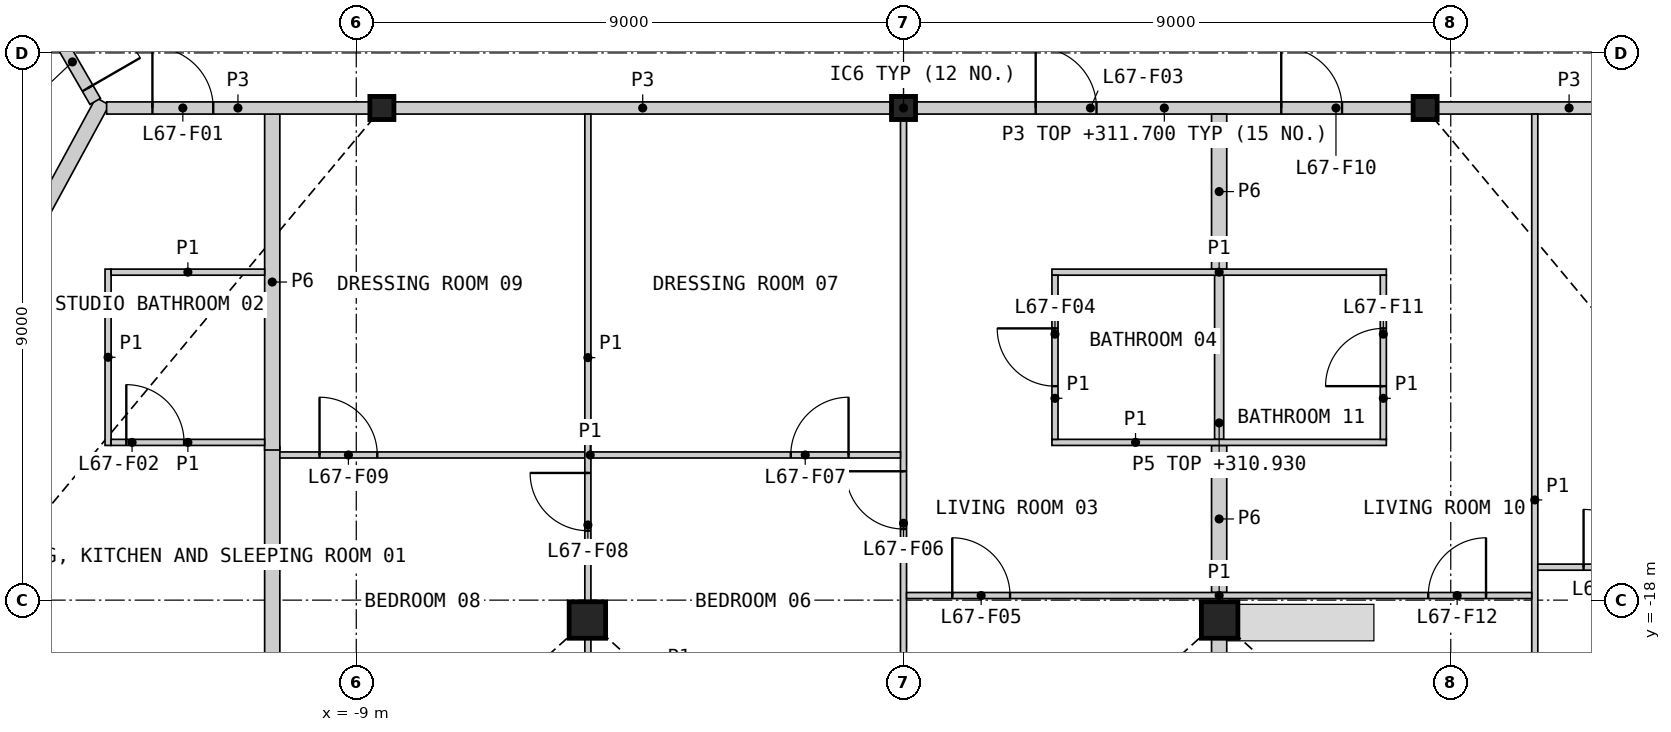
"""IFC4 building model, lengths in metres.
Left out: names, types, materials, properties, quantities, classifications, styles, units other than length and angle.
Written with IfcOpenShell. Run it as: python <this file> out.ifc"""

import sys

from ifc_helpers import new_model, si_unit, direction, frame, frame_2d, origin, origin_2d, place, context, subcontext, project, spatial, rectangle, hollow_rectangle, i_section, extrude, element, fill, save


model = new_model("IFC4")
c1 = context("Model", 3, precision=1e-05, world=origin(), true_north=direction((0.0, 1.0)))
c2 = subcontext(c1, "Body", "Model", "MODEL_VIEW")
j1 = project(units=[si_unit("LENGTHUNIT", "METRE"), si_unit("PLANEANGLEUNIT", "RADIAN")], contexts=[c1])
p1 = place(None, origin())
s1 = spatial("IfcSite", under=j1, at=p1, CompositionType="ELEMENT")
p2 = place(p1, origin())
s2 = spatial("IfcBuilding", under=s1, at=p2, CompositionType="ELEMENT")
p3 = place(p2, frame((0.0, 0.0, 308.6)))
s3 = spatial("IfcBuildingStorey", under=s2, at=p3, CompositionType="ELEMENT", Elevation=308.6)
for number, where, z_axis, x_axis in (
    (1, (-5.199, -18.327, 0.0), (0.0, 0.0, 1.0), (1.0, 0.0, 0.0)),
    (2, (5.199, -18.327, 0.0), (0.0, 0.0, 1.0), (1.0, 0.0, 0.0)),
):
    element("IfcColumn", number, at=place(p3, frame(where, z_axis=z_axis, x_axis=x_axis)), inside=s3, PredefinedType="COLUMN", context=c2, shape_type="SweptSolid", body=[
        extrude(hollow_rectangle(XDim=0.6, YDim=0.6, WallThickness=0.04, at=origin_2d()), origin(), (0.0, 0.0, 1.0), 3.4),
    ])
for number, where, z_axis, x_axis in (
    (3, (-8.578, -9.906, 0.0), (0.0, 0.0, 1.0), (1.0, 0.0, 0.0)),
    (4, (0.0, -9.906, 0.0), (0.0, 0.0, 1.0), (1.0, 0.0, 0.0)),
    (5, (8.578, -9.906, 0.0), (0.0, 0.0, 1.0), (1.0, 0.0, 0.0)),
):
    element("IfcColumn", number, at=place(p3, frame(where, z_axis=z_axis, x_axis=x_axis)), inside=s3, PredefinedType="COLUMN", context=c2, shape_type="SweptSolid", body=[
        extrude(i_section(OverallWidth=0.396, OverallDepth=0.381, WebThickness=0.019, FlangeThickness=0.03, at=origin_2d()), origin(), (0.0, 0.0, 1.0), 3.4),
    ])
p4 = place(p3, frame((-20.383, -23.078, 0.0), z_axis=(0.0, 0.0, 1.0), x_axis=(0.477177412766, 0.878806984921, 0.0)))
e6 = element("IfcWall", 6, at=p4, inside=s3, PredefinedType="PARTITIONING", context=c2, shape_type="SweptSolid", body=[
    extrude(rectangle(XDim=15.114, YDim=0.25, at=frame_2d((7.557, 0.0))), origin(), (0.0, 0.0, 1.0), 2.33),
])
p5 = place(p3, frame((0.208, -9.906, 0.0), z_axis=(0.0, 0.0, 1.0), x_axis=(1.0, 0.0, 0.0)))
e7 = element("IfcWall", 7, at=p5, inside=s3, PredefinedType="PARTITIONING", context=c2, shape_type="SweptSolid", body=[
    extrude(rectangle(XDim=8.163, YDim=0.2, at=frame_2d((4.082, 0.0))), origin(), (0.0, 0.0, 1.0), 3.1),
])
p6 = place(p5, frame((1.966, 0.0, 0.0)))
e8 = element("IfcOpeningElement", 8, at=p6, cuts=e7, PredefinedType="OPENING", context=c2, shape_type="SweptSolid", body=[
    extrude(rectangle(XDim=1.0, YDim=2.1, at=frame_2d((0.5, 1.05))), frame((0.0, 0.11, 0.0), z_axis=(0.0, -1.0, 0.0), x_axis=(1.0, 0.0, 0.0)), (0.0, 0.0, 1.0), 0.22),
])
p7 = place(p5, frame((6.004, 0.0, 0.0)))
e9 = element("IfcOpeningElement", 9, at=p7, cuts=e7, PredefinedType="OPENING", context=c2, shape_type="SweptSolid", body=[
    extrude(rectangle(XDim=1.0, YDim=2.1, at=frame_2d((0.5, 1.05))), frame((0.0, 0.11, 0.0), z_axis=(0.0, -1.0, 0.0), x_axis=(1.0, 0.0, 0.0)), (0.0, 0.0, 1.0), 0.22),
])
p8 = place(p3, frame((-8.371, -9.906, 0.0), z_axis=(0.0, 0.0, 1.0), x_axis=(1.0, 0.0, 0.0)))
e10 = element("IfcWall", 10, at=p8, inside=s3, PredefinedType="PARTITIONING", context=c2, shape_type="SweptSolid", body=[
    extrude(rectangle(XDim=8.163, YDim=0.2, at=frame_2d((4.082, 0.0))), origin(), (0.0, 0.0, 1.0), 3.1),
])
p9 = place(p3, frame((-10.382, -22.698, 0.0), z_axis=(0.0, 0.0, 1.0), x_axis=(0.0, 1.0, 0.0)))
e11 = element("IfcWall", 11, at=p9, inside=s3, PredefinedType="PARTITIONING", context=c2, shape_type="SweptSolid", body=[
    extrude(rectangle(XDim=7.22, YDim=0.25, at=frame_2d((3.61, 0.0))), origin(), (0.0, 0.0, 1.0), 2.33),
])
p10 = place(p3, frame((-10.382, -15.531, 0.0), z_axis=(0.0, 0.0, 1.0), x_axis=(0.0, 1.0, 0.0)))
e12 = element("IfcWall", 12, at=p10, inside=s3, PredefinedType="PARTITIONING", context=c2, shape_type="SweptSolid", body=[
    extrude(rectangle(XDim=5.525, YDim=0.25, at=frame_2d((2.762, 0.0))), origin(), (0.0, 0.0, 1.0), 2.33),
])
p11 = place(p3, frame((-13.106, -9.906, 0.0), z_axis=(0.0, 0.0, 1.0), x_axis=(1.0, 0.0, 0.0)))
e13 = element("IfcWall", 13, at=p11, inside=s3, PredefinedType="PARTITIONING", context=c2, shape_type="SweptSolid", body=[
    extrude(rectangle(XDim=4.32, YDim=0.2, at=frame_2d((2.16, 0.0))), origin(), (0.0, 0.0, 1.0), 3.1),
])
p12 = place(p11, frame((0.753, 0.0, 0.0)))
e14 = element("IfcOpeningElement", 14, at=p12, cuts=e13, PredefinedType="OPENING", context=c2, shape_type="SweptSolid", body=[
    extrude(rectangle(XDim=1.0, YDim=2.1, at=frame_2d((0.5, 1.05))), frame((0.0, 0.11, 0.0), z_axis=(0.0, -1.0, 0.0), x_axis=(1.0, 0.0, 0.0)), (0.0, 0.0, 1.0), 0.22),
])
p13 = place(p3, frame((8.786, -9.906, 0.0), z_axis=(0.0, 0.0, 1.0), x_axis=(1.0, 0.0, 0.0)))
e15 = element("IfcWall", 15, at=p13, inside=s3, PredefinedType="PARTITIONING", context=c2, shape_type="SweptSolid", body=[
    extrude(rectangle(XDim=4.32, YDim=0.2, at=frame_2d((2.16, 0.0))), origin(), (0.0, 0.0, 1.0), 3.1),
])
p14 = place(p3, frame((-15.131, -6.614, 0.0), z_axis=(0.0, 0.0, 1.0), x_axis=(0.499967746641, -0.866044024469, 0.0)))
e16 = element("IfcWall", 16, at=p14, inside=s3, PredefinedType="PARTITIONING", context=c2, shape_type="SweptSolid", body=[
    extrude(rectangle(XDim=3.676, YDim=0.2, at=frame_2d((1.838, 0.0))), origin(), (0.0, 0.0, 1.0), 3.1),
])
p15 = place(p14, frame((2.426, 0.0, 0.0)))
e17 = element("IfcOpeningElement", 17, at=p15, cuts=e16, PredefinedType="OPENING", context=c2, shape_type="SweptSolid", body=[
    extrude(rectangle(XDim=1.0, YDim=2.1, at=frame_2d((0.5, 1.05))), frame((0.0, 0.11, 0.0), z_axis=(0.0, -1.0, 0.0), x_axis=(1.0, 0.0, 0.0)), (0.0, 0.0, 1.0), 0.22),
])
p16 = place(p3, frame((5.191, -12.556, 0.0), z_axis=(0.0, 0.0, 1.0), x_axis=(0.0, 1.0, 0.0)))
e18 = element("IfcWall", 18, at=p16, inside=s3, PredefinedType="PARTITIONING", context=c2, shape_type="SweptSolid", body=[
    extrude(rectangle(XDim=2.55, YDim=0.25, at=frame_2d((1.275, 0.0))), origin(), (0.0, 0.0, 1.0), 2.33),
])
p17 = place(p3, frame((5.191, -17.875, 0.0), z_axis=(0.0, 0.0, 1.0), x_axis=(0.0, 1.0, 0.0)))
e19 = element("IfcWall", 19, at=p17, inside=s3, PredefinedType="PARTITIONING", context=c2, shape_type="SweptSolid", body=[
    extrude(rectangle(XDim=2.419, YDim=0.25, at=frame_2d((1.209, 0.0))), origin(), (0.0, 0.0, 1.0), 2.33),
])
p18 = place(p3, frame((5.191, -19.055, 0.0), z_axis=(0.0, 0.0, 1.0), x_axis=(0.0, 1.0, 0.0)))
e20 = element("IfcWall", 20, at=p18, inside=s3, PredefinedType="PARTITIONING", context=c2, shape_type="SweptSolid", body=[
    extrude(rectangle(XDim=0.418, YDim=0.25, at=frame_2d((0.209, 0.0))), origin(), (0.0, 0.0, 1.0), 2.33),
])
p19 = place(p3, frame((5.191, -15.356, 0.0), z_axis=(0.0, 0.0, 1.0), x_axis=(0.0, 1.0, 0.0)))
e21 = element("IfcWall", 21, at=p19, inside=s3, PredefinedType="PLUMBINGWALL", context=c2, shape_type="SweptSolid", body=[
    extrude(rectangle(XDim=2.7, YDim=0.15, at=frame_2d((1.35, 0.0))), origin(), (0.0, 0.0, 1.0), 2.33),
])
p20 = place(p3, frame((10.382, -22.698, 0.0), z_axis=(0.0, 0.0, 1.0), x_axis=(0.0, 1.0, 0.0)))
e22 = element("IfcWall", 22, at=p20, inside=s3, PredefinedType="PARTITIONING", context=c2, shape_type="SweptSolid", body=[
    extrude(rectangle(XDim=12.692, YDim=0.1, at=frame_2d((6.346, 0.0))), origin(), (0.0, 0.0, 1.0), 2.33),
])
p21 = place(p20, frame((1.153, 0.0, 0.0)))
e23 = element("IfcOpeningElement", 23, at=p21, cuts=e22, PredefinedType="OPENING", context=c2, shape_type="SweptSolid", body=[
    extrude(rectangle(XDim=0.95, YDim=2.1, at=frame_2d((0.475, 1.05))), frame((0.0, 0.06, 0.0), z_axis=(0.0, -1.0, 0.0), x_axis=(1.0, 0.0, 0.0)), (0.0, 0.0, 1.0), 0.12),
])
p22 = place(p3, frame((0.0, -22.698, 0.0), z_axis=(0.0, 0.0, 1.0), x_axis=(0.0, 1.0, 0.0)))
e24 = element("IfcWall", 24, at=p22, inside=s3, PredefinedType="PARTITIONING", context=c2, shape_type="SweptSolid", body=[
    extrude(rectangle(XDim=12.585, YDim=0.1, at=frame_2d((6.292, 0.0))), origin(), (0.0, 0.0, 1.0), 2.33),
])
p23 = place(p22, frame((5.868, 0.0, 0.0)))
e25 = element("IfcOpeningElement", 25, at=p23, cuts=e24, PredefinedType="OPENING", context=c2, shape_type="SweptSolid", body=[
    extrude(rectangle(XDim=0.95, YDim=2.1, at=frame_2d((0.475, 1.05))), frame((0.0, 0.06, 0.0), z_axis=(0.0, -1.0, 0.0), x_axis=(1.0, 0.0, 0.0)), (0.0, 0.0, 1.0), 0.12),
])
p24 = place(p3, frame((0.05, -17.924, 0.0), z_axis=(0.0, 0.0, 1.0), x_axis=(1.0, 0.0, 0.0)))
e26 = element("IfcWall", 26, at=p24, inside=s3, PredefinedType="PARTITIONING", context=c2, shape_type="SweptSolid", body=[
    extrude(rectangle(XDim=10.282, YDim=0.1, at=frame_2d((5.141, 0.0))), origin(), (0.0, 0.0, 1.0), 2.33),
])
p25 = place(p24, frame((0.752, 0.0, 0.0)))
e27 = element("IfcOpeningElement", 27, at=p25, cuts=e26, PredefinedType="OPENING", context=c2, shape_type="SweptSolid", body=[
    extrude(rectangle(XDim=0.95, YDim=2.1, at=frame_2d((0.475, 1.05))), frame((0.0, 0.06, 0.0), z_axis=(0.0, -1.0, 0.0), x_axis=(1.0, 0.0, 0.0)), (0.0, 0.0, 1.0), 0.12),
])
p26 = place(p24, frame((8.58, 0.0, 0.0)))
e28 = element("IfcOpeningElement", 28, at=p26, cuts=e26, PredefinedType="OPENING", context=c2, shape_type="SweptSolid", body=[
    extrude(rectangle(XDim=0.95, YDim=2.1, at=frame_2d((0.475, 1.05))), frame((0.0, 0.06, 0.0), z_axis=(0.0, -1.0, 0.0), x_axis=(1.0, 0.0, 0.0)), (0.0, 0.0, 1.0), 0.12),
])
p27 = place(p3, frame((-10.257, -15.613, 0.0), z_axis=(0.0, 0.0, 1.0), x_axis=(1.0, 0.0, 0.0)))
e29 = element("IfcWall", 29, at=p27, inside=s3, PredefinedType="PARTITIONING", context=c2, shape_type="SweptSolid", body=[
    extrude(rectangle(XDim=10.207, YDim=0.1, at=frame_2d((5.104, 0.0))), origin(), (0.0, 0.0, 1.0), 2.33),
])
p28 = place(p27, frame((8.403, 0.0, 0.0)))
e30 = element("IfcOpeningElement", 30, at=p28, cuts=e29, PredefinedType="OPENING", context=c2, shape_type="SweptSolid", body=[
    extrude(rectangle(XDim=0.95, YDim=2.1, at=frame_2d((0.475, 1.05))), frame((0.0, 0.06, 0.0), z_axis=(0.0, -1.0, 0.0), x_axis=(1.0, 0.0, 0.0)), (0.0, 0.0, 1.0), 0.12),
])
p29 = place(p27, frame((0.653, 0.0, 0.0)))
e31 = element("IfcOpeningElement", 31, at=p29, cuts=e29, PredefinedType="OPENING", context=c2, shape_type="SweptSolid", body=[
    extrude(rectangle(XDim=0.95, YDim=2.1, at=frame_2d((0.475, 1.05))), frame((0.0, 0.06, 0.0), z_axis=(0.0, -1.0, 0.0), x_axis=(1.0, 0.0, 0.0)), (0.0, 0.0, 1.0), 0.12),
])
p30 = place(p3, frame((-5.191, -18.017, 0.0), z_axis=(0.0, 0.0, 1.0), x_axis=(0.0, 1.0, 0.0)))
e32 = element("IfcWall", 32, at=p30, inside=s3, PredefinedType="PARTITIONING", context=c2, shape_type="SweptSolid", body=[
    extrude(rectangle(XDim=8.011, YDim=0.1, at=frame_2d((4.006, 0.0))), origin(), (0.0, 0.0, 1.0), 2.33),
])
p31 = place(p30, frame((1.158, 0.0, 0.0)))
e33 = element("IfcOpeningElement", 33, at=p31, cuts=e32, PredefinedType="OPENING", context=c2, shape_type="SweptSolid", body=[
    extrude(rectangle(XDim=0.95, YDim=2.1, at=frame_2d((0.475, 1.05))), frame((0.0, 0.06, 0.0), z_axis=(0.0, -1.0, 0.0), x_axis=(1.0, 0.0, 0.0)), (0.0, 0.0, 1.0), 0.12),
])
p32 = place(p3, frame((10.432, -17.458, 0.0), z_axis=(0.0, 0.0, 1.0), x_axis=(1.0, 0.0, 0.0)))
e34 = element("IfcWall", 34, at=p32, inside=s3, PredefinedType="PARTITIONING", context=c2, shape_type="SweptSolid", body=[
    extrude(rectangle(XDim=6.775, YDim=0.1, at=frame_2d((3.387, 0.0))), origin(), (0.0, 0.0, 1.0), 2.33),
])
p33 = place(p32, frame((0.752, 0.0, 0.0)))
e35 = element("IfcOpeningElement", 35, at=p33, cuts=e34, PredefinedType="OPENING", context=c2, shape_type="SweptSolid", body=[
    extrude(rectangle(XDim=0.95, YDim=2.1, at=frame_2d((0.475, 1.05))), frame((0.0, 0.06, 0.0), z_axis=(0.0, -1.0, 0.0), x_axis=(1.0, 0.0, 0.0)), (0.0, 0.0, 1.0), 0.12),
])
for number, where, z_axis, x_axis in (
    (36, (2.441, -12.606, 0.0), (0.0, 0.0, 1.0), (1.0, 0.0, 0.0)),
    (37, (2.441, -15.406, 0.0), (0.0, 0.0, 1.0), (1.0, 0.0, 0.0)),
):
    element("IfcWall", number, at=place(p3, frame(where, z_axis=z_axis, x_axis=x_axis)), inside=s3, PredefinedType="PARTITIONING", context=c2, shape_type="SweptSolid", body=[
        extrude(rectangle(XDim=5.5, YDim=0.1, at=frame_2d((2.75, 0.0))), origin(), (0.0, 0.0, 1.0), 2.33),
    ])
p34 = place(p3, frame((-13.082, -15.456, 0.0), z_axis=(0.0, 0.0, 1.0), x_axis=(0.0, 1.0, 0.0)))
e38 = element("IfcWall", 38, at=p34, inside=s3, PredefinedType="PARTITIONING", context=c2, shape_type="SweptSolid", body=[
    extrude(rectangle(XDim=2.9, YDim=0.1, at=frame_2d((1.45, 0.0))), origin(), (0.0, 0.0, 1.0), 2.33),
])
p35 = place(p3, frame((2.491, -15.356, 0.0), z_axis=(0.0, 0.0, 1.0), x_axis=(0.0, 1.0, 0.0)))
e39 = element("IfcWall", 39, at=p35, inside=s3, PredefinedType="PARTITIONING", context=c2, shape_type="SweptSolid", body=[
    extrude(rectangle(XDim=2.7, YDim=0.1, at=frame_2d((1.35, 0.0))), origin(), (0.0, 0.0, 1.0), 2.33),
])
p36 = place(p35, frame((0.875, 0.0, 0.0)))
e40 = element("IfcOpeningElement", 40, at=p36, cuts=e39, PredefinedType="OPENING", context=c2, shape_type="SweptSolid", body=[
    extrude(rectangle(XDim=0.95, YDim=2.1, at=frame_2d((0.475, 1.05))), frame((0.0, 0.06, 0.0), z_axis=(0.0, -1.0, 0.0), x_axis=(1.0, 0.0, 0.0)), (0.0, 0.0, 1.0), 0.12),
])
p37 = place(p3, frame((7.891, -15.356, 0.0), z_axis=(0.0, 0.0, 1.0), x_axis=(0.0, 1.0, 0.0)))
e41 = element("IfcWall", 41, at=p37, inside=s3, PredefinedType="PARTITIONING", context=c2, shape_type="SweptSolid", body=[
    extrude(rectangle(XDim=2.7, YDim=0.1, at=frame_2d((1.35, 0.0))), origin(), (0.0, 0.0, 1.0), 2.33),
])
p38 = place(p37, frame((0.875, 0.0, 0.0)))
e42 = element("IfcOpeningElement", 42, at=p38, cuts=e41, PredefinedType="OPENING", context=c2, shape_type="SweptSolid", body=[
    extrude(rectangle(XDim=0.95, YDim=2.1, at=frame_2d((0.475, 1.05))), frame((0.0, 0.06, 0.0), z_axis=(0.0, -1.0, 0.0), x_axis=(1.0, 0.0, 0.0)), (0.0, 0.0, 1.0), 0.12),
])
p39 = place(p3, frame((-13.032, -12.606, 0.0), z_axis=(0.0, 0.0, 1.0), x_axis=(1.0, 0.0, 0.0)))
e43 = element("IfcWall", 43, at=p39, inside=s3, PredefinedType="PARTITIONING", context=c2, shape_type="SweptSolid", body=[
    extrude(rectangle(XDim=2.525, YDim=0.1, at=frame_2d((1.263, 0.0))), origin(), (0.0, 0.0, 1.0), 2.33),
])
p40 = place(p3, frame((-13.032, -15.406, 0.0), z_axis=(0.0, 0.0, 1.0), x_axis=(1.0, 0.0, 0.0)))
e44 = element("IfcWall", 44, at=p40, inside=s3, PredefinedType="PARTITIONING", context=c2, shape_type="SweptSolid", body=[
    extrude(rectangle(XDim=2.525, YDim=0.1, at=frame_2d((1.263, 0.0))), origin(), (0.0, 0.0, 1.0), 2.33),
])
p41 = place(p40, frame((0.25, 0.0, 0.0)))
e45 = element("IfcOpeningElement", 45, at=p41, cuts=e44, PredefinedType="OPENING", context=c2, shape_type="SweptSolid", body=[
    extrude(rectangle(XDim=0.95, YDim=2.1, at=frame_2d((0.475, 1.05))), frame((0.0, 0.06, 0.0), z_axis=(0.0, -1.0, 0.0), x_axis=(1.0, 0.0, 0.0)), (0.0, 0.0, 1.0), 0.12),
])
p42 = place(p3, frame((-5.191, -19.055, 0.0), z_axis=(0.0, 0.0, 1.0), x_axis=(0.0, 1.0, 0.0)))
e46 = element("IfcWall", 46, at=p42, inside=s3, PredefinedType="PARTITIONING", context=c2, shape_type="SweptSolid", body=[
    extrude(rectangle(XDim=0.418, YDim=0.1, at=frame_2d((0.209, 0.0))), origin(), (0.0, 0.0, 1.0), 2.33),
])
p43 = place(p12, origin())
e47 = element("IfcDoor", 47, at=p43, inside=s3, OperationType="SINGLE_SWING_LEFT", PredefinedType="DOOR", context=c2, shape_type="SweptSolid", body=[
    extrude(rectangle(XDim=1.0, YDim=2.1, at=frame_2d((0.5, 1.05))), frame((0.0, 0.025, 0.0), z_axis=(0.0, -1.0, 0.0), x_axis=(1.0, 0.0, 0.0)), (0.0, 0.0, 1.0), 0.05),
])
fill(e14, e47)
p44 = place(p41, origin())
e48 = element("IfcDoor", 48, at=p44, inside=s3, OperationType="SINGLE_SWING_LEFT", PredefinedType="DOOR", context=c2, shape_type="SweptSolid", body=[
    extrude(rectangle(XDim=0.95, YDim=2.1, at=frame_2d((0.475, 1.05))), frame((0.0, 0.025, 0.0), z_axis=(0.0, -1.0, 0.0), x_axis=(1.0, 0.0, 0.0)), (0.0, 0.0, 1.0), 0.05),
])
fill(e45, e48)
p45 = place(p6, origin())
e49 = element("IfcDoor", 49, at=p45, inside=s3, OperationType="SINGLE_SWING_LEFT", PredefinedType="DOOR", context=c2, shape_type="SweptSolid", body=[
    extrude(rectangle(XDim=1.0, YDim=2.1, at=frame_2d((0.5, 1.05))), frame((0.0, 0.025, 0.0), z_axis=(0.0, -1.0, 0.0), x_axis=(1.0, 0.0, 0.0)), (0.0, 0.0, 1.0), 0.05),
])
fill(e8, e49)
p46 = place(p36, origin())
e50 = element("IfcDoor", 50, at=p46, inside=s3, OperationType="SINGLE_SWING_RIGHT", PredefinedType="DOOR", context=c2, shape_type="SweptSolid", body=[
    extrude(rectangle(XDim=0.95, YDim=2.1, at=frame_2d((0.475, 1.05))), frame((0.0, 0.025, 0.0), z_axis=(0.0, -1.0, 0.0), x_axis=(1.0, 0.0, 0.0)), (0.0, 0.0, 1.0), 0.05),
])
fill(e40, e50)
p47 = place(p25, origin())
e51 = element("IfcDoor", 51, at=p47, inside=s3, OperationType="SINGLE_SWING_LEFT", PredefinedType="DOOR", context=c2, shape_type="SweptSolid", body=[
    extrude(rectangle(XDim=0.95, YDim=2.1, at=frame_2d((0.475, 1.05))), frame((0.0, 0.025, 0.0), z_axis=(0.0, -1.0, 0.0), x_axis=(1.0, 0.0, 0.0)), (0.0, 0.0, 1.0), 0.05),
])
fill(e27, e51)
p48 = place(p23, origin())
e52 = element("IfcDoor", 52, at=p48, inside=s3, OperationType="SINGLE_SWING_RIGHT", PredefinedType="DOOR", context=c2, shape_type="SweptSolid", body=[
    extrude(rectangle(XDim=0.95, YDim=2.1, at=frame_2d((0.475, 1.05))), frame((0.0, 0.025, 0.0), z_axis=(0.0, -1.0, 0.0), x_axis=(1.0, 0.0, 0.0)), (0.0, 0.0, 1.0), 0.05),
])
fill(e25, e52)
p49 = place(p28, origin())
e53 = element("IfcDoor", 53, at=p49, inside=s3, OperationType="SINGLE_SWING_RIGHT", PredefinedType="DOOR", context=c2, shape_type="SweptSolid", body=[
    extrude(rectangle(XDim=0.95, YDim=2.1, at=frame_2d((0.475, 1.05))), frame((0.0, 0.025, 0.0), z_axis=(0.0, -1.0, 0.0), x_axis=(1.0, 0.0, 0.0)), (0.0, 0.0, 1.0), 0.05),
])
fill(e30, e53)
p50 = place(p31, origin())
e54 = element("IfcDoor", 54, at=p50, inside=s3, OperationType="SINGLE_SWING_RIGHT", PredefinedType="DOOR", context=c2, shape_type="SweptSolid", body=[
    extrude(rectangle(XDim=0.95, YDim=2.1, at=frame_2d((0.475, 1.05))), frame((0.0, 0.025, 0.0), z_axis=(0.0, -1.0, 0.0), x_axis=(1.0, 0.0, 0.0)), (0.0, 0.0, 1.0), 0.05),
])
fill(e33, e54)
p51 = place(p29, origin())
e55 = element("IfcDoor", 55, at=p51, inside=s3, OperationType="SINGLE_SWING_LEFT", PredefinedType="DOOR", context=c2, shape_type="SweptSolid", body=[
    extrude(rectangle(XDim=0.95, YDim=2.1, at=frame_2d((0.475, 1.05))), frame((0.0, 0.025, 0.0), z_axis=(0.0, -1.0, 0.0), x_axis=(1.0, 0.0, 0.0)), (0.0, 0.0, 1.0), 0.05),
])
fill(e31, e55)
p52 = place(p7, origin())
e56 = element("IfcDoor", 56, at=p52, inside=s3, OperationType="SINGLE_SWING_LEFT", PredefinedType="DOOR", context=c2, shape_type="SweptSolid", body=[
    extrude(rectangle(XDim=1.0, YDim=2.1, at=frame_2d((0.5, 1.05))), frame((0.0, 0.025, 0.0), z_axis=(0.0, -1.0, 0.0), x_axis=(1.0, 0.0, 0.0)), (0.0, 0.0, 1.0), 0.05),
])
fill(e9, e56)
p53 = place(p38, origin())
e57 = element("IfcDoor", 57, at=p53, inside=s3, OperationType="SINGLE_SWING_LEFT", PredefinedType="DOOR", context=c2, shape_type="SweptSolid", body=[
    extrude(rectangle(XDim=0.95, YDim=2.1, at=frame_2d((0.475, 1.05))), frame((0.0, 0.025, 0.0), z_axis=(0.0, -1.0, 0.0), x_axis=(1.0, 0.0, 0.0)), (0.0, 0.0, 1.0), 0.05),
])
fill(e42, e57)
p54 = place(p26, origin())
e58 = element("IfcDoor", 58, at=p54, inside=s3, OperationType="SINGLE_SWING_RIGHT", PredefinedType="DOOR", context=c2, shape_type="SweptSolid", body=[
    extrude(rectangle(XDim=0.95, YDim=2.1, at=frame_2d((0.475, 1.05))), frame((0.0, 0.025, 0.0), z_axis=(0.0, -1.0, 0.0), x_axis=(1.0, 0.0, 0.0)), (0.0, 0.0, 1.0), 0.05),
])
fill(e28, e58)
p55 = place(p33, origin())
e59 = element("IfcDoor", 59, at=p55, inside=s3, OperationType="SINGLE_SWING_LEFT", PredefinedType="DOOR", context=c2, shape_type="SweptSolid", body=[
    extrude(rectangle(XDim=0.95, YDim=2.1, at=frame_2d((0.475, 1.05))), frame((0.0, 0.025, 0.0), z_axis=(0.0, -1.0, 0.0), x_axis=(1.0, 0.0, 0.0)), (0.0, 0.0, 1.0), 0.05),
])
fill(e35, e59)
p56 = place(p15, origin())
e60 = element("IfcDoor", 60, at=p56, inside=s3, OperationType="SINGLE_SWING_RIGHT", PredefinedType="DOOR", context=c2, shape_type="SweptSolid", body=[
    extrude(rectangle(XDim=1.0, YDim=2.1, at=frame_2d((0.5, 1.05))), frame((0.0, 0.025, 0.0), z_axis=(0.0, -1.0, 0.0), x_axis=(1.0, 0.0, 0.0)), (0.0, 0.0, 1.0), 0.05),
])
fill(e17, e60)
save(model, sys.argv[1])
